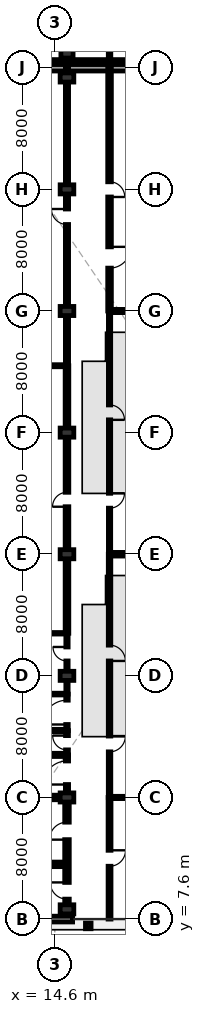
"""IFC4 building model, lengths in metres.
Left out: names, types, materials, properties, quantities, classifications, styles, units other than length and angle.
Written with IfcOpenShell. Run it as: python <this file> out.ifc"""

import sys

from ifc_helpers import new_model, si_unit, direction, frame, frame_2d, origin, origin_2d, place, context, subcontext, project, spatial, rectangle, i_section, extrude, element, fill, save


model = new_model("IFC4")
c1 = context("Model", 3, precision=1e-05, world=origin(), true_north=direction((0.0, 1.0)))
c2 = subcontext(c1, "Body", "Model", "MODEL_VIEW")
j1 = project(units=[si_unit("LENGTHUNIT", "METRE"), si_unit("PLANEANGLEUNIT", "RADIAN")], contexts=[c1])
p1 = place(None, origin())
s1 = spatial("IfcSite", under=j1, at=p1, CompositionType="ELEMENT")
p2 = place(p1, origin())
s2 = spatial("IfcBuilding", under=s1, at=p2, CompositionType="ELEMENT")
p3 = place(p2, origin())
s3 = spatial("IfcBuildingStorey", under=s2, at=p3, CompositionType="ELEMENT", Elevation=0.0)
for number, where, z_axis, x_axis in (
    (1, (15.4, 8.24, 0.0), (0.0, 0.0, 1.0), (1.0, 0.0, 0.0)),
    (2, (15.4, 15.6, 0.0), (0.0, 0.0, 1.0), (1.0, 0.0, 0.0)),
    (3, (15.4, 23.6, 0.0), (0.0, 0.0, 1.0), (1.0, 0.0, 0.0)),
    (4, (15.4, 31.6, 0.0), (0.0, 0.0, 1.0), (1.0, 0.0, 0.0)),
    (5, (15.4, 39.6, 0.0), (0.0, 0.0, 1.0), (1.0, 0.0, 0.0)),
    (6, (15.4, 47.6, 0.0), (0.0, 0.0, 1.0), (1.0, 0.0, 0.0)),
    (7, (15.4, 55.6, 0.0), (0.0, 0.0, 1.0), (1.0, 0.0, 0.0)),
    (8, (15.4, 62.96, 0.0), (0.0, 0.0, 1.0), (1.0, 0.0, 0.0)),
):
    element("IfcColumn", number, at=place(p3, frame(where, z_axis=z_axis, x_axis=x_axis)), inside=s3, PredefinedType="COLUMN", context=c2, shape_type="SweptSolid", body=[
        extrude(rectangle(XDim=0.6, YDim=0.9, at=origin_2d()), origin(), (0.0, 0.0, 1.0), 5.4),
    ])
p4 = place(p3, frame((15.4, 64.64, 0.0), z_axis=(0.0, 0.0, 1.0), x_axis=(1.0, 0.0, 0.0)))
e9 = element("IfcColumn", 9, at=p4, inside=s3, PredefinedType="COLUMN", context=c2, shape_type="SweptSolid", body=[
    extrude(rectangle(XDim=0.8, YDim=0.8, at=origin_2d()), origin(), (0.0, 0.0, 1.0), 5.4),
])
p5 = place(p3, frame((16.8, 7.15, 0.0), z_axis=(0.0, 0.0, 1.0), x_axis=(1.0, 0.0, 0.0)))
e10 = element("IfcColumn", 10, at=p5, inside=s3, PredefinedType="COLUMN", context=c2, shape_type="SweptSolid", body=[
    extrude(i_section(OverallWidth=0.373, OverallDepth=0.368, WebThickness=0.014, FlangeThickness=0.024, at=origin_2d()), origin(), (0.0, 0.0, 1.0), 5.4),
])
p6 = place(p3, frame((8.0, 63.6, 0.0), z_axis=(0.0, 0.0, 1.0), x_axis=(1.0, 0.0, 0.0)))
e11 = element("IfcWall", 11, at=p6, inside=s3, PredefinedType="SOLIDWALL", context=c2, shape_type="SweptSolid", body=[
    extrude(rectangle(XDim=38.0, YDim=0.425, at=frame_2d((19.0, 0.0))), origin(), (0.0, 0.0, 1.0), 5.14),
])
p7 = place(p3, frame((15.77, 7.6, 0.0), z_axis=(0.0, 0.0, 1.0), x_axis=(-1.0, 0.0, 0.0)))
e12 = element("IfcWall", 12, at=p7, inside=s3, PredefinedType="SOLIDWALL", context=c2, shape_type="SweptSolid", body=[
    extrude(rectangle(XDim=7.77, YDim=0.38, at=frame_2d((3.885, 0.0))), origin(), (0.0, 0.0, 1.0), 5.14),
])
p8 = place(p7, frame((3.27, 0.0, 0.0)))
e13 = element("IfcOpeningElement", 13, at=p8, cuts=e12, PredefinedType="OPENING", context=c2, shape_type="SweptSolid", body=[
    extrude(rectangle(XDim=2.0, YDim=2.5, at=frame_2d((1.0, 1.25))), frame((0.0, 0.2, 0.0), z_axis=(0.0, -1.0, 0.0), x_axis=(1.0, 0.0, 0.0)), (0.0, 0.0, 1.0), 0.4),
])
p9 = place(p3, frame((40.2, 64.0, 0.0), z_axis=(0.0, 0.0, 1.0), x_axis=(-1.0, 0.0, 0.0)))
e14 = element("IfcWall", 14, at=p9, inside=s3, PredefinedType="SOLIDWALL", context=c2, shape_type="SweptSolid", body=[
    extrude(rectangle(XDim=32.2, YDim=0.275, at=frame_2d((16.1, 0.0))), origin(), (0.0, 0.0, 1.0), 5.12),
])
p10 = place(p3, frame((15.4, 64.15, 0.0), z_axis=(0.0, 0.0, 1.0), x_axis=(0.0, 1.0, 0.0)))
e15 = element("IfcWall", 15, at=p10, inside=s3, PredefinedType="SHEAR", context=c2, shape_type="SweptSolid", body=[
    extrude(rectangle(XDim=7.048, YDim=0.3, at=frame_2d((3.524, 0.0))), origin(), (0.0, 0.0, 1.0), 5.12),
])
p11 = place(p10, frame((1.1, 0.0, 0.0)))
e16 = element("IfcOpeningElement", 16, at=p11, cuts=e15, PredefinedType="OPENING", context=c2, shape_type="SweptSolid", body=[
    extrude(rectangle(XDim=1.1, YDim=2.15, at=frame_2d((0.55, 1.075))), frame((0.0, 0.16, 0.0), z_axis=(0.0, -1.0, 0.0), x_axis=(1.0, 0.0, 0.0)), (0.0, 0.0, 1.0), 0.32),
])
p12 = place(p10, frame((4.875, 0.0, 0.0)))
e17 = element("IfcOpeningElement", 17, at=p12, cuts=e15, PredefinedType="OPENING", context=c2, shape_type="SweptSolid", body=[
    extrude(rectangle(XDim=1.15, YDim=2.2, at=frame_2d((0.575, 1.1))), frame((0.0, 0.16, 0.0), z_axis=(0.0, -1.0, 0.0), x_axis=(1.0, 0.0, 0.0)), (0.0, 0.0, 1.0), 0.32),
])
p13 = place(p3, frame((7.85, 15.6, 0.0), z_axis=(0.0, 0.0, 1.0), x_axis=(1.0, 0.0, 0.0)))
e18 = element("IfcWall", 18, at=p13, inside=s3, PredefinedType="SHEAR", context=c2, shape_type="SweptSolid", body=[
    extrude(rectangle(XDim=7.248, YDim=0.3, at=frame_2d((3.624, 0.0))), origin(), (0.0, 0.0, 1.0), 5.14),
])
p14 = place(p3, frame((15.4, 8.692, 0.0), z_axis=(0.0, 0.0, 1.0), x_axis=(0.0, 1.0, 0.0)))
e19 = element("IfcWall", 19, at=p14, inside=s3, PredefinedType="SHEAR", context=c2, shape_type="SweptSolid", body=[
    extrude(rectangle(XDim=6.456, YDim=0.3, at=frame_2d((3.228, 0.0))), origin(), (0.0, 0.0, 1.0), 5.14),
])
p15 = place(p14, frame((0.22, 0.0, 0.0)))
e20 = element("IfcOpeningElement", 20, at=p15, cuts=e19, PredefinedType="OPENING", context=c2, shape_type="SweptSolid", body=[
    extrude(rectangle(XDim=1.1, YDim=2.15, at=frame_2d((0.55, 1.075))), frame((0.0, 0.16, 0.0), z_axis=(0.0, -1.0, 0.0), x_axis=(1.0, 0.0, 0.0)), (0.0, 0.0, 1.0), 0.32),
])
p16 = place(p14, frame((4.133, 0.0, 0.0)))
e21 = element("IfcOpeningElement", 21, at=p16, cuts=e19, PredefinedType="OPENING", context=c2, shape_type="SweptSolid", body=[
    extrude(rectangle(XDim=1.15, YDim=2.2, at=frame_2d((0.575, 1.1))), frame((0.0, 0.16, 0.0), z_axis=(0.0, -1.0, 0.0), x_axis=(1.0, 0.0, 0.0)), (0.0, 0.0, 1.0), 0.32),
])
p17 = place(p3, frame((8.15, 11.2, 0.0), z_axis=(0.0, 0.0, 1.0), x_axis=(1.0, 0.0, 0.0)))
e22 = element("IfcWall", 22, at=p17, inside=s3, PredefinedType="SHEAR", context=c2, shape_type="SweptSolid", body=[
    extrude(rectangle(XDim=7.1, YDim=0.3, at=frame_2d((3.55, 0.0))), origin(), (0.0, 0.0, 1.0), 5.14),
])
p18 = place(p3, frame((15.4, 16.052, 0.0), z_axis=(0.0, 0.0, 1.0), x_axis=(0.0, 1.0, 0.0)))
e23 = element("IfcWall", 23, at=p18, inside=s3, PredefinedType="PARTITIONING", context=c2, shape_type="SweptSolid", body=[
    extrude(rectangle(XDim=2.348, YDim=0.21, at=frame_2d((1.174, 0.0))), origin(), (0.0, 0.0, 1.0), 4.29),
])
p19 = place(p18, frame((0.399, 0.0, 0.0)))
e24 = element("IfcOpeningElement", 24, at=p19, cuts=e23, PredefinedType="OPENING", context=c2, shape_type="SweptSolid", body=[
    extrude(rectangle(XDim=1.55, YDim=2.25, at=frame_2d((0.775, 1.125))), frame((0.0, 0.115, 0.0), z_axis=(0.0, -1.0, 0.0), x_axis=(1.0, 0.0, 0.0)), (0.0, 0.0, 1.0), 0.23),
])
p20 = place(p3, frame((15.4, 18.4, 0.0), z_axis=(0.0, 0.0, 1.0), x_axis=(0.0, 1.0, 0.0)))
e25 = element("IfcWall", 25, at=p20, inside=s3, PredefinedType="PARTITIONING", context=c2, shape_type="SweptSolid", body=[
    extrude(rectangle(XDim=1.6, YDim=0.19, at=frame_2d((0.8, 0.0))), origin(), (0.0, 0.0, 1.0), 4.29),
])
p21 = place(p20, frame((0.33, 0.0, 0.0)))
e26 = element("IfcOpeningElement", 26, at=p21, cuts=e25, PredefinedType="OPENING", context=c2, shape_type="SweptSolid", body=[
    extrude(rectangle(XDim=0.94, YDim=2.15, at=frame_2d((0.47, 1.075))), frame((0.0, 0.105, 0.0), z_axis=(0.0, -1.0, 0.0), x_axis=(1.0, 0.0, 0.0)), (0.0, 0.0, 1.0), 0.21),
])
p22 = place(p3, frame((15.4, 20.0, 0.0), z_axis=(0.0, 0.0, 1.0), x_axis=(0.0, 1.0, 0.0)))
e27 = element("IfcWall", 27, at=p22, inside=s3, PredefinedType="PARTITIONING", context=c2, shape_type="SweptSolid", body=[
    extrude(rectangle(XDim=2.4, YDim=0.165, at=frame_2d((1.2, 0.0))), origin(), (0.0, 0.0, 1.0), 4.29),
])
p23 = place(p22, frame((0.4, 0.0, 0.0)))
e28 = element("IfcOpeningElement", 28, at=p23, cuts=e27, PredefinedType="OPENING", context=c2, shape_type="SweptSolid", body=[
    extrude(rectangle(XDim=1.6, YDim=2.3, at=frame_2d((0.8, 1.15))), frame((0.0, 0.093, 0.0), z_axis=(0.0, -1.0, 0.0), x_axis=(1.0, 0.0, 0.0)), (0.0, 0.0, 1.0), 0.185),
])
p24 = place(p3, frame((15.4, 22.4, 0.0), z_axis=(0.0, 0.0, 1.0), x_axis=(0.0, 1.0, 0.0)))
e29 = element("IfcWall", 29, at=p24, inside=s3, PredefinedType="PARTITIONING", context=c2, shape_type="SweptSolid", body=[
    extrude(rectangle(XDim=4.0, YDim=0.15, at=frame_2d((2.0, 0.0))), origin(), (0.0, 0.0, 1.0), 4.29),
])
p25 = place(p24, frame((2.18, 0.0, 0.0)))
e30 = element("IfcOpeningElement", 30, at=p25, cuts=e29, PredefinedType="OPENING", context=c2, shape_type="SweptSolid", body=[
    extrude(rectangle(XDim=0.92, YDim=2.1, at=frame_2d((0.46, 1.05))), frame((0.0, 0.085, 0.0), z_axis=(0.0, -1.0, 0.0), x_axis=(1.0, 0.0, 0.0)), (0.0, 0.0, 1.0), 0.17),
])
p26 = place(p3, frame((15.4, 26.4, 0.0), z_axis=(0.0, 0.0, 1.0), x_axis=(0.0, 1.0, 0.0)))
e31 = element("IfcWall", 31, at=p26, inside=s3, PredefinedType="PARTITIONING", context=c2, shape_type="SweptSolid", body=[
    extrude(rectangle(XDim=17.6, YDim=0.24, at=frame_2d((8.8, 0.0))), origin(), (0.0, 0.0, 1.0), 4.29),
])
p27 = place(p26, frame((8.325, 0.0, 0.0)))
e32 = element("IfcOpeningElement", 32, at=p27, cuts=e31, PredefinedType="OPENING", context=c2, shape_type="SweptSolid", body=[
    extrude(rectangle(XDim=0.95, YDim=2.1, at=frame_2d((0.475, 1.05))), frame((0.0, 0.13, 0.0), z_axis=(0.0, -1.0, 0.0), x_axis=(1.0, 0.0, 0.0)), (0.0, 0.0, 1.0), 0.26),
])
p28 = place(p3, frame((15.4, 44.0, 0.0), z_axis=(0.0, 0.0, 1.0), x_axis=(0.0, 1.0, 0.0)))
e33 = element("IfcWall", 33, at=p28, inside=s3, PredefinedType="PARTITIONING", context=c2, shape_type="SweptSolid", body=[
    extrude(rectangle(XDim=19.6, YDim=0.21, at=frame_2d((9.8, 0.0))), origin(), (0.0, 0.0, 1.0), 4.29),
])
p29 = place(p28, frame((9.29, 0.0, 0.0)))
e34 = element("IfcOpeningElement", 34, at=p29, cuts=e33, PredefinedType="OPENING", context=c2, shape_type="SweptSolid", body=[
    extrude(rectangle(XDim=1.02, YDim=2.1, at=frame_2d((0.51, 1.05))), frame((0.0, 0.115, 0.0), z_axis=(0.0, -1.0, 0.0), x_axis=(1.0, 0.0, 0.0)), (0.0, 0.0, 1.0), 0.23),
])
p30 = place(p3, frame((18.2, 15.6, 0.0), z_axis=(0.0, 0.0, 1.0), x_axis=(0.0, -1.0, 0.0)))
e35 = element("IfcWall", 35, at=p30, inside=s3, PredefinedType="PARTITIONING", context=c2, shape_type="SweptSolid", body=[
    extrude(rectangle(XDim=8.0, YDim=0.19, at=frame_2d((4.0, 0.0))), origin(), (0.0, 0.0, 1.0), 5.14),
])
p31 = place(p30, frame((3.475, 0.0, 0.0)))
e36 = element("IfcOpeningElement", 36, at=p31, cuts=e35, PredefinedType="OPENING", context=c2, shape_type="SweptSolid", body=[
    extrude(rectangle(XDim=1.05, YDim=2.15, at=frame_2d((0.525, 1.075))), frame((0.0, 0.105, 0.0), z_axis=(0.0, -1.0, 0.0), x_axis=(1.0, 0.0, 0.0)), (0.0, 0.0, 1.0), 0.21),
])
p32 = place(p3, frame((18.2, 31.6, 0.0), z_axis=(0.0, 0.0, 1.0), x_axis=(0.0, -1.0, 0.0)))
e37 = element("IfcWall", 37, at=p32, inside=s3, PredefinedType="PARTITIONING", context=c2, shape_type="SweptSolid", body=[
    extrude(rectangle(XDim=16.0, YDim=0.165, at=frame_2d((8.0, 0.0))), origin(), (0.0, 0.0, 1.0), 5.14),
])
p33 = place(p32, frame((5.98, 0.0, 0.0)))
e38 = element("IfcOpeningElement", 38, at=p33, cuts=e37, PredefinedType="OPENING", context=c2, shape_type="SweptSolid", body=[
    extrude(rectangle(XDim=1.04, YDim=2.2, at=frame_2d((0.52, 1.1))), frame((0.0, 0.093, 0.0), z_axis=(0.0, -1.0, 0.0), x_axis=(1.0, 0.0, 0.0)), (0.0, 0.0, 1.0), 0.185),
])
p34 = place(p32, frame((11.96, 0.0, 0.0)))
e39 = element("IfcOpeningElement", 39, at=p34, cuts=e37, PredefinedType="OPENING", context=c2, shape_type="SweptSolid", body=[
    extrude(rectangle(XDim=1.04, YDim=2.2, at=frame_2d((0.52, 1.1))), frame((0.0, 0.093, 0.0), z_axis=(0.0, -1.0, 0.0), x_axis=(1.0, 0.0, 0.0)), (0.0, 0.0, 1.0), 0.185),
])
p35 = place(p3, frame((18.2, 47.6, 0.0), z_axis=(0.0, 0.0, 1.0), x_axis=(0.0, -1.0, 0.0)))
e40 = element("IfcWall", 40, at=p35, inside=s3, PredefinedType="PARTITIONING", context=c2, shape_type="SweptSolid", body=[
    extrude(rectangle(XDim=16.0, YDim=0.15, at=frame_2d((8.0, 0.0))), origin(), (0.0, 0.0, 1.0), 5.14),
])
p36 = place(p35, frame((6.18, 0.0, 0.0)))
e41 = element("IfcOpeningElement", 41, at=p36, cuts=e40, PredefinedType="OPENING", context=c2, shape_type="SweptSolid", body=[
    extrude(rectangle(XDim=0.98, YDim=2.1, at=frame_2d((0.49, 1.05))), frame((0.0, 0.085, 0.0), z_axis=(0.0, -1.0, 0.0), x_axis=(1.0, 0.0, 0.0)), (0.0, 0.0, 1.0), 0.17),
])
p37 = place(p35, frame((11.99, 0.0, 0.0)))
e42 = element("IfcOpeningElement", 42, at=p37, cuts=e40, PredefinedType="OPENING", context=c2, shape_type="SweptSolid", body=[
    extrude(rectangle(XDim=0.98, YDim=2.1, at=frame_2d((0.49, 1.05))), frame((0.0, 0.085, 0.0), z_axis=(0.0, -1.0, 0.0), x_axis=(1.0, 0.0, 0.0)), (0.0, 0.0, 1.0), 0.17),
])
p38 = place(p3, frame((18.2, 63.6, 0.0), z_axis=(0.0, 0.0, 1.0), x_axis=(0.0, -1.0, 0.0)))
e43 = element("IfcWall", 43, at=p38, inside=s3, PredefinedType="PARTITIONING", context=c2, shape_type="SweptSolid", body=[
    extrude(rectangle(XDim=16.0, YDim=0.24, at=frame_2d((8.0, 0.0))), origin(), (0.0, 0.0, 1.0), 5.14),
])
p39 = place(p38, frame((7.5, 0.0, 0.0)))
e44 = element("IfcOpeningElement", 44, at=p39, cuts=e43, PredefinedType="OPENING", context=c2, shape_type="SweptSolid", body=[
    extrude(rectangle(XDim=1.0, YDim=2.1, at=frame_2d((0.5, 1.05))), frame((0.0, 0.13, 0.0), z_axis=(0.0, -1.0, 0.0), x_axis=(1.0, 0.0, 0.0)), (0.0, 0.0, 1.0), 0.26),
])
p40 = place(p38, frame((11.78, 0.0, 0.0)))
e45 = element("IfcOpeningElement", 45, at=p40, cuts=e43, PredefinedType="OPENING", context=c2, shape_type="SweptSolid", body=[
    extrude(rectangle(XDim=1.4, YDim=2.25, at=frame_2d((0.7, 1.125))), frame((0.0, 0.13, 0.0), z_axis=(0.0, -1.0, 0.0), x_axis=(1.0, 0.0, 0.0)), (0.0, 0.0, 1.0), 0.26),
])
p41 = place(p3, frame((12.0, 18.4, 0.0), z_axis=(0.0, 0.0, 1.0), x_axis=(1.0, 0.0, 0.0)))
e46 = element("IfcWall", 46, at=p41, inside=s3, PredefinedType="PARTITIONING", context=c2, shape_type="SweptSolid", body=[
    extrude(rectangle(XDim=3.4, YDim=0.21, at=frame_2d((1.7, 0.0))), origin(), (0.0, 0.0, 1.0), 5.14),
])
p42 = place(p3, frame((8.0, 20.0, 0.0), z_axis=(0.0, 0.0, 1.0), x_axis=(1.0, 0.0, 0.0)))
e47 = element("IfcWall", 47, at=p42, inside=s3, PredefinedType="PARTITIONING", context=c2, shape_type="SweptSolid", body=[
    extrude(rectangle(XDim=7.4, YDim=0.165, at=frame_2d((3.7, 0.0))), origin(), (0.0, 0.0, 1.0), 5.14),
])
p43 = place(p3, frame((8.0, 22.4, 0.0), z_axis=(0.0, 0.0, 1.0), x_axis=(1.0, 0.0, 0.0)))
e48 = element("IfcWall", 48, at=p43, inside=s3, PredefinedType="PARTITIONING", context=c2, shape_type="SweptSolid", body=[
    extrude(rectangle(XDim=7.4, YDim=0.115, at=frame_2d((3.7, 0.0))), origin(), (0.0, 0.0, 1.0), 5.14),
])
p44 = place(p3, frame((8.0, 26.4, 0.0), z_axis=(0.0, 0.0, 1.0), x_axis=(1.0, 0.0, 0.0)))
e49 = element("IfcWall", 49, at=p44, inside=s3, PredefinedType="PARTITIONING", context=c2, shape_type="SweptSolid", body=[
    extrude(rectangle(XDim=7.4, YDim=0.1, at=frame_2d((3.7, 0.0))), origin(), (0.0, 0.0, 1.0), 5.14),
])
p45 = place(p3, frame((8.0, 44.0, 0.0), z_axis=(0.0, 0.0, 1.0), x_axis=(1.0, 0.0, 0.0)))
e50 = element("IfcWall", 50, at=p45, inside=s3, PredefinedType="PARTITIONING", context=c2, shape_type="SweptSolid", body=[
    extrude(rectangle(XDim=7.4, YDim=0.135, at=frame_2d((3.7, 0.0))), origin(), (0.0, 0.0, 1.0), 5.14),
])
p46 = place(p3, frame((18.2, 15.6, 0.0), z_axis=(0.0, 0.0, 1.0), x_axis=(1.0, 0.0, 0.0)))
e51 = element("IfcWall", 51, at=p46, inside=s3, PredefinedType="PARTITIONING", context=c2, shape_type="SweptSolid", body=[
    extrude(rectangle(XDim=27.8, YDim=0.15, at=frame_2d((13.9, 0.0))), origin(), (0.0, 0.0, 1.0), 4.29),
])
p47 = place(p3, frame((18.2, 31.6, 0.0), z_axis=(0.0, 0.0, 1.0), x_axis=(1.0, 0.0, 0.0)))
e52 = element("IfcWall", 52, at=p47, inside=s3, PredefinedType="PARTITIONING", context=c2, shape_type="SweptSolid", body=[
    extrude(rectangle(XDim=27.8, YDim=0.24, at=frame_2d((13.9, 0.0))), origin(), (0.0, 0.0, 1.0), 4.29),
])
p48 = place(p3, frame((18.2, 47.6, 0.0), z_axis=(0.0, 0.0, 1.0), x_axis=(1.0, 0.0, 0.0)))
e53 = element("IfcWall", 53, at=p48, inside=s3, PredefinedType="PARTITIONING", context=c2, shape_type="SweptSolid", body=[
    extrude(rectangle(XDim=27.8, YDim=0.21, at=frame_2d((13.9, 0.0))), origin(), (0.0, 0.0, 1.0), 4.29),
])
p49 = place(p3, frame((18.2, 79.6, 0.0), z_axis=(0.0, 0.0, 1.0), x_axis=(0.0, -1.0, 0.0)))
e54 = element("IfcWall", 54, at=p49, inside=s3, PredefinedType="PARTITIONING", context=c2, shape_type="SweptSolid", body=[
    extrude(rectangle(XDim=15.6, YDim=0.165, at=frame_2d((7.8, 0.0))), origin(), (0.0, 0.0, 1.0), 5.12),
])
p50 = place(p49, frame((6.975, 0.0, 0.0)))
e55 = element("IfcOpeningElement", 55, at=p50, cuts=e54, PredefinedType="OPENING", context=c2, shape_type="SweptSolid", body=[
    extrude(rectangle(XDim=1.65, YDim=2.3, at=frame_2d((0.825, 1.15))), frame((0.0, 0.093, 0.0), z_axis=(0.0, -1.0, 0.0), x_axis=(1.0, 0.0, 0.0)), (0.0, 0.0, 1.0), 0.185),
])
p51 = place(p49, frame((11.343, 0.0, 0.0)))
e56 = element("IfcOpeningElement", 56, at=p51, cuts=e54, PredefinedType="OPENING", context=c2, shape_type="SweptSolid", body=[
    extrude(rectangle(XDim=1.65, YDim=2.3, at=frame_2d((0.825, 1.15))), frame((0.0, 0.093, 0.0), z_axis=(0.0, -1.0, 0.0), x_axis=(1.0, 0.0, 0.0)), (0.0, 0.0, 1.0), 0.185),
])
p52 = place(p15, origin())
e57 = element("IfcDoor", 57, at=p52, inside=s3, OperationType="SINGLE_SWING_RIGHT", PredefinedType="DOOR", context=c2, shape_type="SweptSolid", body=[
    extrude(rectangle(XDim=1.1, YDim=2.15, at=frame_2d((0.55, 1.075))), frame((0.0, 0.025, 0.0), z_axis=(0.0, -1.0, 0.0), x_axis=(1.0, 0.0, 0.0)), (0.0, 0.0, 1.0), 0.05),
])
fill(e20, e57)
p53 = place(p16, origin())
e58 = element("IfcDoor", 58, at=p53, inside=s3, OperationType="SINGLE_SWING_LEFT", PredefinedType="DOOR", context=c2, shape_type="SweptSolid", body=[
    extrude(rectangle(XDim=1.15, YDim=2.2, at=frame_2d((0.575, 1.1))), frame((0.0, 0.025, 0.0), z_axis=(0.0, -1.0, 0.0), x_axis=(1.0, 0.0, 0.0)), (0.0, 0.0, 1.0), 0.05),
])
fill(e21, e58)
p54 = place(p19, origin())
e59 = element("IfcDoor", 59, at=p54, inside=s3, OperationType="SINGLE_SWING_LEFT", PredefinedType="DOOR", context=c2, shape_type="SweptSolid", body=[
    extrude(rectangle(XDim=1.55, YDim=2.25, at=frame_2d((0.775, 1.125))), frame((0.0, 0.025, 0.0), z_axis=(0.0, -1.0, 0.0), x_axis=(1.0, 0.0, 0.0)), (0.0, 0.0, 1.0), 0.05),
])
fill(e24, e59)
p55 = place(p21, origin())
e60 = element("IfcDoor", 60, at=p55, inside=s3, OperationType="SINGLE_SWING_RIGHT", PredefinedType="DOOR", context=c2, shape_type="SweptSolid", body=[
    extrude(rectangle(XDim=0.94, YDim=2.15, at=frame_2d((0.47, 1.075))), frame((0.0, 0.025, 0.0), z_axis=(0.0, -1.0, 0.0), x_axis=(1.0, 0.0, 0.0)), (0.0, 0.0, 1.0), 0.05),
])
fill(e26, e60)
p56 = place(p23, origin())
e61 = element("IfcDoor", 61, at=p56, inside=s3, OperationType="SINGLE_SWING_LEFT", PredefinedType="DOOR", context=c2, shape_type="SweptSolid", body=[
    extrude(rectangle(XDim=1.6, YDim=2.3, at=frame_2d((0.8, 1.15))), frame((0.0, 0.025, 0.0), z_axis=(0.0, -1.0, 0.0), x_axis=(1.0, 0.0, 0.0)), (0.0, 0.0, 1.0), 0.05),
])
fill(e28, e61)
p57 = place(p25, origin())
e62 = element("IfcDoor", 62, at=p57, inside=s3, OperationType="SINGLE_SWING_RIGHT", PredefinedType="DOOR", context=c2, shape_type="SweptSolid", body=[
    extrude(rectangle(XDim=0.92, YDim=2.1, at=frame_2d((0.46, 1.05))), frame((0.0, 0.025, 0.0), z_axis=(0.0, -1.0, 0.0), x_axis=(1.0, 0.0, 0.0)), (0.0, 0.0, 1.0), 0.05),
])
fill(e30, e62)
p58 = place(p27, origin())
e63 = element("IfcDoor", 63, at=p58, inside=s3, OperationType="SINGLE_SWING_LEFT", PredefinedType="DOOR", context=c2, shape_type="SweptSolid", body=[
    extrude(rectangle(XDim=0.95, YDim=2.1, at=frame_2d((0.475, 1.05))), frame((0.0, 0.025, 0.0), z_axis=(0.0, -1.0, 0.0), x_axis=(1.0, 0.0, 0.0)), (0.0, 0.0, 1.0), 0.05),
])
fill(e32, e63)
p59 = place(p29, origin())
e64 = element("IfcDoor", 64, at=p59, inside=s3, OperationType="SINGLE_SWING_RIGHT", PredefinedType="DOOR", context=c2, shape_type="SweptSolid", body=[
    extrude(rectangle(XDim=1.02, YDim=2.1, at=frame_2d((0.51, 1.05))), frame((0.0, 0.025, 0.0), z_axis=(0.0, -1.0, 0.0), x_axis=(1.0, 0.0, 0.0)), (0.0, 0.0, 1.0), 0.05),
])
fill(e34, e64)
p60 = place(p31, origin())
e65 = element("IfcDoor", 65, at=p60, inside=s3, OperationType="SINGLE_SWING_LEFT", PredefinedType="DOOR", context=c2, shape_type="SweptSolid", body=[
    extrude(rectangle(XDim=1.05, YDim=2.15, at=frame_2d((0.525, 1.075))), frame((0.0, 0.025, 0.0), z_axis=(0.0, -1.0, 0.0), x_axis=(1.0, 0.0, 0.0)), (0.0, 0.0, 1.0), 0.05),
])
fill(e36, e65)
p61 = place(p33, origin())
e66 = element("IfcDoor", 66, at=p61, inside=s3, OperationType="SINGLE_SWING_RIGHT", PredefinedType="DOOR", context=c2, shape_type="SweptSolid", body=[
    extrude(rectangle(XDim=1.04, YDim=2.2, at=frame_2d((0.52, 1.1))), frame((0.0, 0.025, 0.0), z_axis=(0.0, -1.0, 0.0), x_axis=(1.0, 0.0, 0.0)), (0.0, 0.0, 1.0), 0.05),
])
fill(e38, e66)
p62 = place(p34, origin())
e67 = element("IfcDoor", 67, at=p62, inside=s3, OperationType="SINGLE_SWING_LEFT", PredefinedType="DOOR", context=c2, shape_type="SweptSolid", body=[
    extrude(rectangle(XDim=1.04, YDim=2.2, at=frame_2d((0.52, 1.1))), frame((0.0, 0.025, 0.0), z_axis=(0.0, -1.0, 0.0), x_axis=(1.0, 0.0, 0.0)), (0.0, 0.0, 1.0), 0.05),
])
fill(e39, e67)
p63 = place(p36, origin())
e68 = element("IfcDoor", 68, at=p63, inside=s3, OperationType="SINGLE_SWING_RIGHT", PredefinedType="DOOR", context=c2, shape_type="SweptSolid", body=[
    extrude(rectangle(XDim=0.98, YDim=2.1, at=frame_2d((0.49, 1.05))), frame((0.0, 0.025, 0.0), z_axis=(0.0, -1.0, 0.0), x_axis=(1.0, 0.0, 0.0)), (0.0, 0.0, 1.0), 0.05),
])
fill(e41, e68)
p64 = place(p37, origin())
e69 = element("IfcDoor", 69, at=p64, inside=s3, OperationType="SINGLE_SWING_LEFT", PredefinedType="DOOR", context=c2, shape_type="SweptSolid", body=[
    extrude(rectangle(XDim=0.98, YDim=2.1, at=frame_2d((0.49, 1.05))), frame((0.0, 0.025, 0.0), z_axis=(0.0, -1.0, 0.0), x_axis=(1.0, 0.0, 0.0)), (0.0, 0.0, 1.0), 0.05),
])
fill(e42, e69)
p65 = place(p39, origin())
e70 = element("IfcDoor", 70, at=p65, inside=s3, OperationType="SINGLE_SWING_RIGHT", PredefinedType="DOOR", context=c2, shape_type="SweptSolid", body=[
    extrude(rectangle(XDim=1.0, YDim=2.1, at=frame_2d((0.5, 1.05))), frame((0.0, 0.025, 0.0), z_axis=(0.0, -1.0, 0.0), x_axis=(1.0, 0.0, 0.0)), (0.0, 0.0, 1.0), 0.05),
])
fill(e44, e70)
p66 = place(p40, origin())
e71 = element("IfcDoor", 71, at=p66, inside=s3, OperationType="SINGLE_SWING_LEFT", PredefinedType="DOOR", context=c2, shape_type="SweptSolid", body=[
    extrude(rectangle(XDim=1.4, YDim=2.25, at=frame_2d((0.7, 1.125))), frame((0.0, 0.025, 0.0), z_axis=(0.0, -1.0, 0.0), x_axis=(1.0, 0.0, 0.0)), (0.0, 0.0, 1.0), 0.05),
])
fill(e45, e71)
save(model, sys.argv[1])
